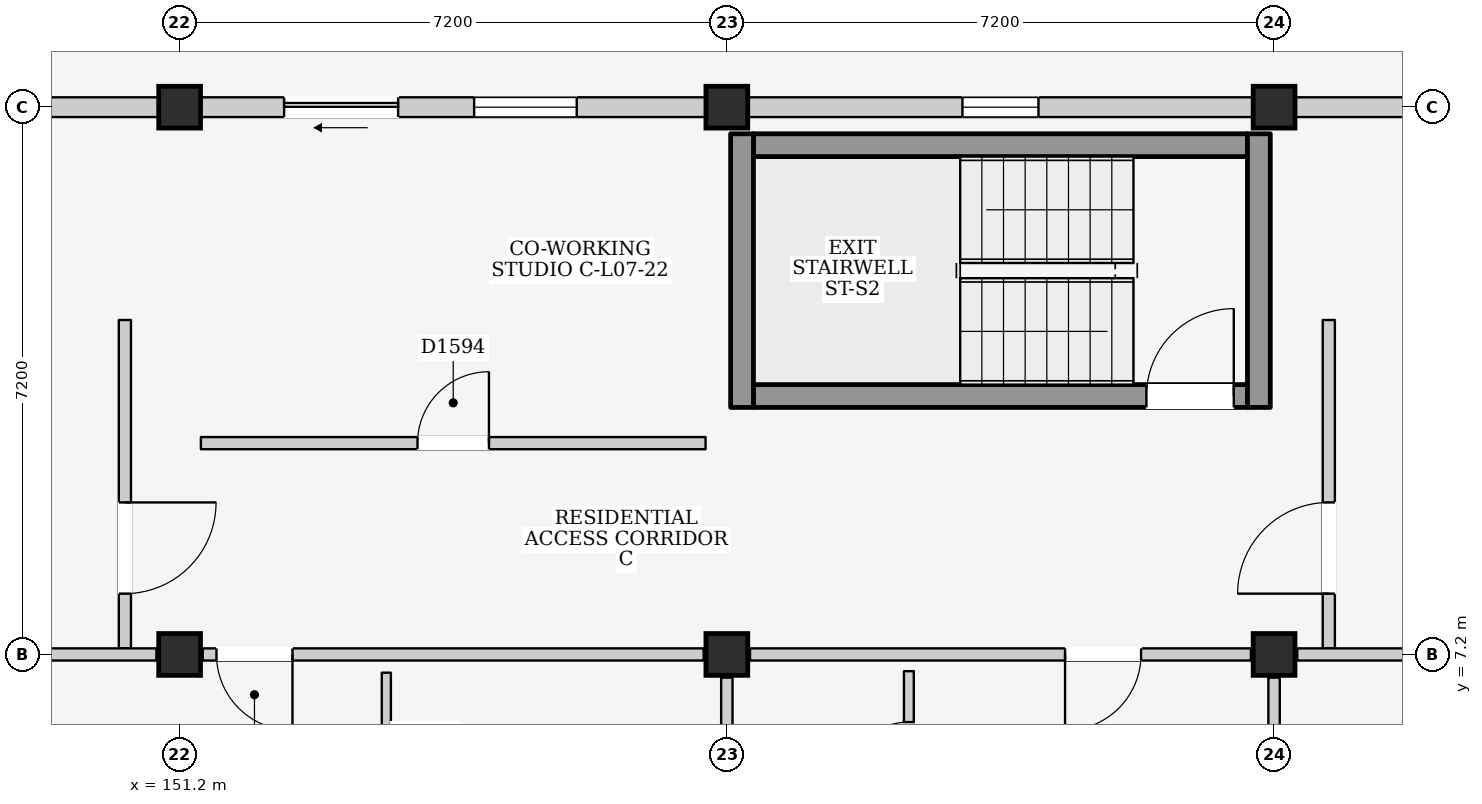
"""IFC4 building model, lengths in metres.
Left out: names, types, materials, properties, quantities, classifications, styles, units other than length and angle.
Written with IfcOpenShell. Run it as: python <this file> out.ifc"""

import sys

from ifc_helpers import new_model, si_unit, direction, frame, frame_2d, origin, origin_2d, place, context, subcontext, project, spatial, rectangle, extrude, element, fill, save


model = new_model("IFC4")
c1 = context("Model", 3, precision=1e-05, world=origin(), true_north=direction((0.0, 1.0)))
c2 = subcontext(c1, "Body", "Model", "MODEL_VIEW")
j1 = project(units=[si_unit("LENGTHUNIT", "METRE"), si_unit("PLANEANGLEUNIT", "RADIAN")], contexts=[c1])
p1 = place(None, origin())
s1 = spatial("IfcSite", under=j1, at=p1, CompositionType="ELEMENT")
p2 = place(p1, origin())
s2 = spatial("IfcBuilding", under=s1, at=p2, CompositionType="ELEMENT")
p3 = place(p2, frame((0.0, 0.0, 25.1)))
s3 = spatial("IfcBuildingStorey", under=s2, at=p3, CompositionType="ELEMENT", Elevation=25.1)
for number, where, z_axis, x_axis in (
    (1, (151.2, 7.2, 0.0), (0.0, 0.0, 1.0), (1.0, 0.0, 0.0)),
    (2, (151.2, 14.4, 0.0), (0.0, 0.0, 1.0), (1.0, 0.0, 0.0)),
    (3, (158.4, 7.2, 0.0), (0.0, 0.0, 1.0), (1.0, 0.0, 0.0)),
    (4, (158.4, 14.4, 0.0), (0.0, 0.0, 1.0), (1.0, 0.0, 0.0)),
    (5, (165.6, 7.2, 0.0), (0.0, 0.0, 1.0), (1.0, 0.0, 0.0)),
    (6, (165.6, 14.4, 0.0), (0.0, 0.0, 1.0), (1.0, 0.0, 0.0)),
):
    element("IfcColumn", number, at=place(p3, frame(where, z_axis=z_axis, x_axis=x_axis)), inside=s3, PredefinedType="COLUMN", context=c2, shape_type="SweptSolid", body=[
        extrude(rectangle(XDim=0.55, YDim=0.55, at=origin_2d()), origin(), (0.0, 0.0, 1.0), 3.2),
    ])
p4 = place(p3, frame((144.275, 14.4, 0.0), z_axis=(0.0, 0.0, 1.0), x_axis=(1.0, 0.0, 0.0)))
e7 = element("IfcWall", 7, at=p4, inside=s3, PredefinedType="ELEMENTEDWALL", context=c2, shape_type="SweptSolid", body=[
    extrude(rectangle(XDim=6.65, YDim=0.26, at=frame_2d((3.325, 0.0))), origin(), (0.0, 0.0, 1.0), 2.375),
])
p5 = place(p4, frame((2.825, 0.0, 1.2)))
e8 = element("IfcOpeningElement", 8, at=p5, cuts=e7, PredefinedType="OPENING", context=c2, shape_type="SweptSolid", body=[
    extrude(rectangle(XDim=1.0, YDim=0.9, at=frame_2d((0.5, 0.45))), frame((0.0, 0.145, 0.0), z_axis=(0.0, -1.0, 0.0), x_axis=(1.0, 0.0, 0.0)), (0.0, 0.0, 1.0), 0.29),
])
p6 = place(p3, frame((151.475, 14.4, 0.0), z_axis=(0.0, 0.0, 1.0), x_axis=(1.0, 0.0, 0.0)))
e9 = element("IfcWall", 9, at=p6, inside=s3, PredefinedType="ELEMENTEDWALL", context=c2, shape_type="SweptSolid", body=[
    extrude(rectangle(XDim=6.65, YDim=0.26, at=frame_2d((3.325, 0.0))), origin(), (0.0, 0.0, 1.0), 2.375),
])
p7 = place(p6, frame((1.1, 0.0, 0.0)))
e10 = element("IfcOpeningElement", 10, at=p7, cuts=e9, PredefinedType="OPENING", context=c2, shape_type="SweptSolid", body=[
    extrude(rectangle(XDim=1.5, YDim=2.12, at=frame_2d((0.75, 1.06))), frame((0.0, 0.145, 0.0), z_axis=(0.0, -1.0, 0.0), x_axis=(1.0, 0.0, 0.0)), (0.0, 0.0, 1.0), 0.29),
])
p8 = place(p6, frame((3.6, 0.0, 0.765)))
e11 = element("IfcOpeningElement", 11, at=p8, cuts=e9, PredefinedType="OPENING", context=c2, shape_type="SweptSolid", body=[
    extrude(rectangle(XDim=1.35, YDim=1.5, at=frame_2d((0.675, 0.75))), frame((0.0, 0.145, 0.0), z_axis=(0.0, -1.0, 0.0), x_axis=(1.0, 0.0, 0.0)), (0.0, 0.0, 1.0), 0.29),
])
p9 = place(p3, frame((158.675, 14.4, 0.0), z_axis=(0.0, 0.0, 1.0), x_axis=(1.0, 0.0, 0.0)))
e12 = element("IfcWall", 12, at=p9, inside=s3, PredefinedType="ELEMENTEDWALL", context=c2, shape_type="SweptSolid", body=[
    extrude(rectangle(XDim=6.65, YDim=0.26, at=frame_2d((3.325, 0.0))), origin(), (0.0, 0.0, 1.0), 2.375),
])
p10 = place(p9, frame((2.825, 0.0, 1.2)))
e13 = element("IfcOpeningElement", 13, at=p10, cuts=e12, PredefinedType="OPENING", context=c2, shape_type="SweptSolid", body=[
    extrude(rectangle(XDim=1.0, YDim=0.9, at=frame_2d((0.5, 0.45))), frame((0.0, 0.145, 0.0), z_axis=(0.0, -1.0, 0.0), x_axis=(1.0, 0.0, 0.0)), (0.0, 0.0, 1.0), 0.29),
])
p11 = place(p3, frame((165.875, 14.4, 0.0), z_axis=(0.0, 0.0, 1.0), x_axis=(1.0, 0.0, 0.0)))
e14 = element("IfcWall", 14, at=p11, inside=s3, PredefinedType="ELEMENTEDWALL", context=c2, shape_type="SweptSolid", body=[
    extrude(rectangle(XDim=6.65, YDim=0.26, at=frame_2d((3.325, 0.0))), origin(), (0.0, 0.0, 1.0), 2.375),
])
p12 = place(p11, frame((2.825, 0.0, 1.2)))
e15 = element("IfcOpeningElement", 15, at=p12, cuts=e14, PredefinedType="OPENING", context=c2, shape_type="SweptSolid", body=[
    extrude(rectangle(XDim=1.0, YDim=0.9, at=frame_2d((0.5, 0.45))), frame((0.0, 0.145, 0.0), z_axis=(0.0, -1.0, 0.0), x_axis=(1.0, 0.0, 0.0)), (0.0, 0.0, 1.0), 0.29),
])
p13 = place(p3, frame((150.48, 7.28, 0.0), z_axis=(0.0, 0.0, 1.0), x_axis=(0.0, 1.0, 0.0)))
e16 = element("IfcWall", 16, at=p13, inside=s3, PredefinedType="PARTITIONING", context=c2, shape_type="SweptSolid", body=[
    extrude(rectangle(XDim=4.32, YDim=0.16, at=frame_2d((2.16, 0.0))), origin(), (0.0, 0.0, 1.0), 2.99),
])
p14 = place(p13, frame((0.72, 0.0, 0.0)))
e17 = element("IfcOpeningElement", 17, at=p14, cuts=e16, PredefinedType="OPENING", context=c2, shape_type="SweptSolid", body=[
    extrude(rectangle(XDim=1.2, YDim=2.2, at=frame_2d((0.6, 1.1))), frame((0.0, 0.095, 0.0), z_axis=(0.0, -1.0, 0.0), x_axis=(1.0, 0.0, 0.0)), (0.0, 0.0, 1.0), 0.19),
])
p15 = place(p3, frame((158.75, 10.6, 0.0), z_axis=(0.0, 0.0, 1.0), x_axis=(1.0, 0.0, 0.0)))
e18 = element("IfcWall", 18, at=p15, inside=s3, PredefinedType="SHEAR", context=c2, shape_type="SweptSolid", body=[
    extrude(rectangle(XDim=6.5, YDim=0.3, at=frame_2d((3.25, 0.0))), origin(), (0.0, 0.0, 1.0), 2.99),
])
p16 = place(p15, frame((5.17, 0.0, 0.0)))
e19 = element("IfcOpeningElement", 19, at=p16, cuts=e18, PredefinedType="OPENING", context=c2, shape_type="SweptSolid", body=[
    extrude(rectangle(XDim=1.15, YDim=2.2, at=frame_2d((0.575, 1.1))), frame((0.0, 0.165, 0.0), z_axis=(0.0, -1.0, 0.0), x_axis=(1.0, 0.0, 0.0)), (0.0, 0.0, 1.0), 0.33),
])
p17 = place(p3, frame((158.75, 13.9, 0.0), z_axis=(0.0, 0.0, 1.0), x_axis=(1.0, 0.0, 0.0)))
e20 = element("IfcWall", 20, at=p17, inside=s3, PredefinedType="SHEAR", context=c2, shape_type="SweptSolid", body=[
    extrude(rectangle(XDim=6.5, YDim=0.3, at=frame_2d((3.25, 0.0))), origin(), (0.0, 0.0, 1.0), 2.99),
])
for number, where, z_axis, x_axis in (
    (21, (158.6, 10.45, 0.0), (0.0, 0.0, 1.0), (0.0, 1.0, 0.0)),
    (22, (165.4, 10.45, 0.0), (0.0, 0.0, 1.0), (0.0, 1.0, 0.0)),
):
    element("IfcWall", number, at=place(p3, frame(where, z_axis=z_axis, x_axis=x_axis)), inside=s3, PredefinedType="SHEAR", context=c2, shape_type="SweptSolid", body=[
        extrude(rectangle(XDim=3.6, YDim=0.3, at=frame_2d((1.8, 0.0))), origin(), (0.0, 0.0, 1.0), 2.99),
    ])
p18 = place(p3, frame((166.32, 7.28, 0.0), z_axis=(0.0, 0.0, 1.0), x_axis=(0.0, 1.0, 0.0)))
e23 = element("IfcWall", 23, at=p18, inside=s3, PredefinedType="PARTITIONING", context=c2, shape_type="SweptSolid", body=[
    extrude(rectangle(XDim=4.32, YDim=0.16, at=frame_2d((2.16, 0.0))), origin(), (0.0, 0.0, 1.0), 2.99),
])
p19 = place(p18, frame((0.72, 0.0, 0.0)))
e24 = element("IfcOpeningElement", 24, at=p19, cuts=e23, PredefinedType="OPENING", context=c2, shape_type="SweptSolid", body=[
    extrude(rectangle(XDim=1.2, YDim=2.2, at=frame_2d((0.6, 1.1))), frame((0.0, 0.095, 0.0), z_axis=(0.0, -1.0, 0.0), x_axis=(1.0, 0.0, 0.0)), (0.0, 0.0, 1.0), 0.19),
])
p20 = place(p3, frame((144.305, 7.2, 0.0), z_axis=(0.0, 0.0, 1.0), x_axis=(1.0, 0.0, 0.0)))
e25 = element("IfcWall", 25, at=p20, inside=s3, PredefinedType="PARTITIONING", context=c2, shape_type="SweptSolid", body=[
    extrude(rectangle(XDim=6.59, YDim=0.16, at=frame_2d((3.295, 0.0))), origin(), (0.0, 0.0, 1.0), 2.375),
])
p21 = place(p3, frame((151.505, 7.2, 0.0), z_axis=(0.0, 0.0, 1.0), x_axis=(1.0, 0.0, 0.0)))
e26 = element("IfcWall", 26, at=p21, inside=s3, PredefinedType="PARTITIONING", context=c2, shape_type="SweptSolid", body=[
    extrude(rectangle(XDim=6.59, YDim=0.16, at=frame_2d((3.295, 0.0))), origin(), (0.0, 0.0, 1.0), 2.375),
])
p22 = place(p21, frame((0.18, 0.0, 0.0)))
e27 = element("IfcOpeningElement", 27, at=p22, cuts=e26, PredefinedType="OPENING", context=c2, shape_type="SweptSolid", body=[
    extrude(rectangle(XDim=1.0, YDim=2.15, at=frame_2d((0.5, 1.075))), frame((0.0, 0.095, 0.0), z_axis=(0.0, -1.0, 0.0), x_axis=(1.0, 0.0, 0.0)), (0.0, 0.0, 1.0), 0.19),
])
p23 = place(p3, frame((158.4, 0.305, 0.0), z_axis=(0.0, 0.0, 1.0), x_axis=(0.0, 1.0, 0.0)))
e28 = element("IfcWall", 28, at=p23, inside=s3, PredefinedType="PARTITIONING", context=c2, shape_type="SweptSolid", body=[
    extrude(rectangle(XDim=6.59, YDim=0.15, at=frame_2d((3.295, 0.0))), origin(), (0.0, 0.0, 1.0), 2.475),
])
p24 = place(p3, frame((153.92, 3.92, 0.0), z_axis=(0.0, 0.0, 1.0), x_axis=(0.0, 1.0, 0.0)))
e29 = element("IfcWall", 29, at=p24, inside=s3, PredefinedType="PARTITIONING", context=c2, shape_type="SweptSolid", body=[
    extrude(rectangle(XDim=3.04, YDim=0.12, at=frame_2d((1.52, 0.0))), origin(), (0.0, 0.0, 1.0), 2.99),
])
p25 = place(p24, frame((1.04, 0.0, 0.0)))
e30 = element("IfcOpeningElement", 30, at=p25, cuts=e29, PredefinedType="OPENING", context=c2, shape_type="SweptSolid", body=[
    extrude(rectangle(XDim=0.96, YDim=2.15, at=frame_2d((0.48, 1.075))), frame((0.0, 0.075, 0.0), z_axis=(0.0, -1.0, 0.0), x_axis=(1.0, 0.0, 0.0)), (0.0, 0.0, 1.0), 0.15),
])
p26 = place(p3, frame((158.705, 7.2, 0.0), z_axis=(0.0, 0.0, 1.0), x_axis=(1.0, 0.0, 0.0)))
e31 = element("IfcWall", 31, at=p26, inside=s3, PredefinedType="PARTITIONING", context=c2, shape_type="SweptSolid", body=[
    extrude(rectangle(XDim=6.59, YDim=0.16, at=frame_2d((3.295, 0.0))), origin(), (0.0, 0.0, 1.0), 2.375),
])
p27 = place(p26, frame((4.145, 0.0, 0.0)))
e32 = element("IfcOpeningElement", 32, at=p27, cuts=e31, PredefinedType="OPENING", context=c2, shape_type="SweptSolid", body=[
    extrude(rectangle(XDim=1.0, YDim=2.15, at=frame_2d((0.5, 1.075))), frame((0.0, 0.095, 0.0), z_axis=(0.0, -1.0, 0.0), x_axis=(1.0, 0.0, 0.0)), (0.0, 0.0, 1.0), 0.19),
])
p28 = place(p3, frame((165.6, 0.305, 0.0), z_axis=(0.0, 0.0, 1.0), x_axis=(0.0, 1.0, 0.0)))
e33 = element("IfcWall", 33, at=p28, inside=s3, PredefinedType="PARTITIONING", context=c2, shape_type="SweptSolid", body=[
    extrude(rectangle(XDim=6.59, YDim=0.15, at=frame_2d((3.295, 0.0))), origin(), (0.0, 0.0, 1.0), 2.475),
])
p29 = place(p3, frame((160.795, 4.76, 0.0), z_axis=(0.0, 0.0, 1.0), x_axis=(0.0, 1.0, 0.0)))
e34 = element("IfcWall", 34, at=p29, inside=s3, PredefinedType="PARTITIONING", context=c2, shape_type="SweptSolid", body=[
    extrude(rectangle(XDim=2.22, YDim=0.13, at=frame_2d((1.11, 0.0))), origin(), (0.0, 0.0, 1.0), 2.99),
])
p30 = place(p29, frame((0.67, 0.0, 0.0)))
e35 = element("IfcOpeningElement", 35, at=p30, cuts=e34, PredefinedType="OPENING", context=c2, shape_type="SweptSolid", body=[
    extrude(rectangle(XDim=0.88, YDim=2.1, at=frame_2d((0.44, 1.05))), frame((0.0, 0.08, 0.0), z_axis=(0.0, -1.0, 0.0), x_axis=(1.0, 0.0, 0.0)), (0.0, 0.0, 1.0), 0.16),
])
p31 = place(p3, frame((165.905, 7.2, 0.0), z_axis=(0.0, 0.0, 1.0), x_axis=(1.0, 0.0, 0.0)))
e36 = element("IfcWall", 36, at=p31, inside=s3, PredefinedType="PARTITIONING", context=c2, shape_type="SweptSolid", body=[
    extrude(rectangle(XDim=6.59, YDim=0.16, at=frame_2d((3.295, 0.0))), origin(), (0.0, 0.0, 1.0), 2.375),
])
p32 = place(p3, frame((151.48, 9.98, 0.0), z_axis=(0.0, 0.0, 1.0), x_axis=(1.0, 0.0, 0.0)))
e37 = element("IfcWall", 37, at=p32, inside=s3, PredefinedType="PARTITIONING", context=c2, shape_type="SweptSolid", body=[
    extrude(rectangle(XDim=6.64, YDim=0.16, at=frame_2d((3.32, 0.0))), origin(), (0.0, 0.0, 1.0), 2.99),
])
p33 = place(p32, frame((2.85, 0.0, 0.0)))
e38 = element("IfcOpeningElement", 38, at=p33, cuts=e37, PredefinedType="OPENING", context=c2, shape_type="SweptSolid", body=[
    extrude(rectangle(XDim=0.94, YDim=2.12, at=frame_2d((0.47, 1.06))), frame((0.0, 0.095, 0.0), z_axis=(0.0, -1.0, 0.0), x_axis=(1.0, 0.0, 0.0)), (0.0, 0.0, 1.0), 0.19),
])
p34 = place(p7, frame((1.5, 0.0, 0.0), z_axis=(0.0, 0.0, 1.0), x_axis=(-1.0, 0.0, 0.0)))
e39 = element("IfcDoor", 39, at=p34, inside=s3, OperationType="SLIDING_TO_LEFT", PredefinedType="DOOR", context=c2, shape_type="SweptSolid", body=[
    extrude(rectangle(XDim=1.5, YDim=2.12, at=frame_2d((0.75, 1.06))), frame((0.0, 0.025, 0.0), z_axis=(0.0, -1.0, 0.0), x_axis=(1.0, 0.0, 0.0)), (0.0, 0.0, 1.0), 0.05),
])
fill(e10, e39)
p35 = place(p8, origin())
e40 = element("IfcWindow", 40, at=p35, inside=s3, PartitioningType="SINGLE_PANEL", PredefinedType="WINDOW", context=c2, shape_type="SweptSolid", body=[
    extrude(rectangle(XDim=1.35, YDim=1.5, at=frame_2d((0.675, 0.75))), frame((0.0, 0.03, 0.0), z_axis=(0.0, -1.0, 0.0), x_axis=(1.0, 0.0, 0.0)), (0.0, 0.0, 1.0), 0.06),
])
fill(e11, e40)
p36 = place(p10, origin())
e41 = element("IfcWindow", 41, at=p36, inside=s3, PartitioningType="SINGLE_PANEL", PredefinedType="WINDOW", context=c2, shape_type="SweptSolid", body=[
    extrude(rectangle(XDim=1.0, YDim=0.9, at=frame_2d((0.5, 0.45))), frame((0.0, 0.03, 0.0), z_axis=(0.0, -1.0, 0.0), x_axis=(1.0, 0.0, 0.0)), (0.0, 0.0, 1.0), 0.06),
])
fill(e13, e41)
p37 = place(p14, frame((1.2, 0.0, 0.0), z_axis=(0.0, 0.0, 1.0), x_axis=(-1.0, 0.0, 0.0)))
e42 = element("IfcDoor", 42, at=p37, inside=s3, OperationType="SINGLE_SWING_LEFT", PredefinedType="DOOR", context=c2, shape_type="SweptSolid", body=[
    extrude(rectangle(XDim=1.2, YDim=2.2, at=frame_2d((0.6, 1.1))), frame((0.0, 0.025, 0.0), z_axis=(0.0, -1.0, 0.0), x_axis=(1.0, 0.0, 0.0)), (0.0, 0.0, 1.0), 0.05),
])
fill(e17, e42)
p38 = place(p16, origin())
e43 = element("IfcDoor", 43, at=p38, inside=s3, OperationType="SINGLE_SWING_RIGHT", PredefinedType="DOOR", context=c2, shape_type="SweptSolid", body=[
    extrude(rectangle(XDim=1.15, YDim=2.2, at=frame_2d((0.575, 1.1))), frame((0.0, 0.025, 0.0), z_axis=(0.0, -1.0, 0.0), x_axis=(1.0, 0.0, 0.0)), (0.0, 0.0, 1.0), 0.05),
])
fill(e19, e43)
p39 = place(p19, origin())
e44 = element("IfcDoor", 44, at=p39, inside=s3, OperationType="SINGLE_SWING_LEFT", PredefinedType="DOOR", context=c2, shape_type="SweptSolid", body=[
    extrude(rectangle(XDim=1.2, YDim=2.2, at=frame_2d((0.6, 1.1))), frame((0.0, 0.025, 0.0), z_axis=(0.0, -1.0, 0.0), x_axis=(1.0, 0.0, 0.0)), (0.0, 0.0, 1.0), 0.05),
])
fill(e24, e44)
p40 = place(p22, frame((1.0, 0.0, 0.0), z_axis=(0.0, 0.0, 1.0), x_axis=(-1.0, 0.0, 0.0)))
e45 = element("IfcDoor", 45, at=p40, inside=s3, OperationType="SINGLE_SWING_LEFT", PredefinedType="DOOR", context=c2, shape_type="SweptSolid", body=[
    extrude(rectangle(XDim=1.0, YDim=2.15, at=frame_2d((0.5, 1.075))), frame((0.0, 0.025, 0.0), z_axis=(0.0, -1.0, 0.0), x_axis=(1.0, 0.0, 0.0)), (0.0, 0.0, 1.0), 0.05),
])
fill(e27, e45)
p41 = place(p27, frame((1.0, 0.0, 0.0), z_axis=(0.0, 0.0, 1.0), x_axis=(-1.0, 0.0, 0.0)))
e46 = element("IfcDoor", 46, at=p41, inside=s3, OperationType="SINGLE_SWING_RIGHT", PredefinedType="DOOR", context=c2, shape_type="SweptSolid", body=[
    extrude(rectangle(XDim=1.0, YDim=2.15, at=frame_2d((0.5, 1.075))), frame((0.0, 0.025, 0.0), z_axis=(0.0, -1.0, 0.0), x_axis=(1.0, 0.0, 0.0)), (0.0, 0.0, 1.0), 0.05),
])
fill(e32, e46)
p42 = place(p30, origin())
e47 = element("IfcDoor", 47, at=p42, inside=s3, OperationType="SINGLE_SWING_LEFT", PredefinedType="DOOR", context=c2, shape_type="SweptSolid", body=[
    extrude(rectangle(XDim=0.88, YDim=2.1, at=frame_2d((0.44, 1.05))), frame((0.0, 0.025, 0.0), z_axis=(0.0, -1.0, 0.0), x_axis=(1.0, 0.0, 0.0)), (0.0, 0.0, 1.0), 0.05),
])
fill(e35, e47)
p43 = place(p33, origin())
e48 = element("IfcDoor", 48, at=p43, inside=s3, OperationType="SINGLE_SWING_RIGHT", PredefinedType="DOOR", context=c2, shape_type="SweptSolid", body=[
    extrude(rectangle(XDim=0.94, YDim=2.12, at=frame_2d((0.47, 1.06))), frame((0.0, 0.025, 0.0), z_axis=(0.0, -1.0, 0.0), x_axis=(1.0, 0.0, 0.0)), (0.0, 0.0, 1.0), 0.05),
])
fill(e38, e48)
save(model, sys.argv[1])
